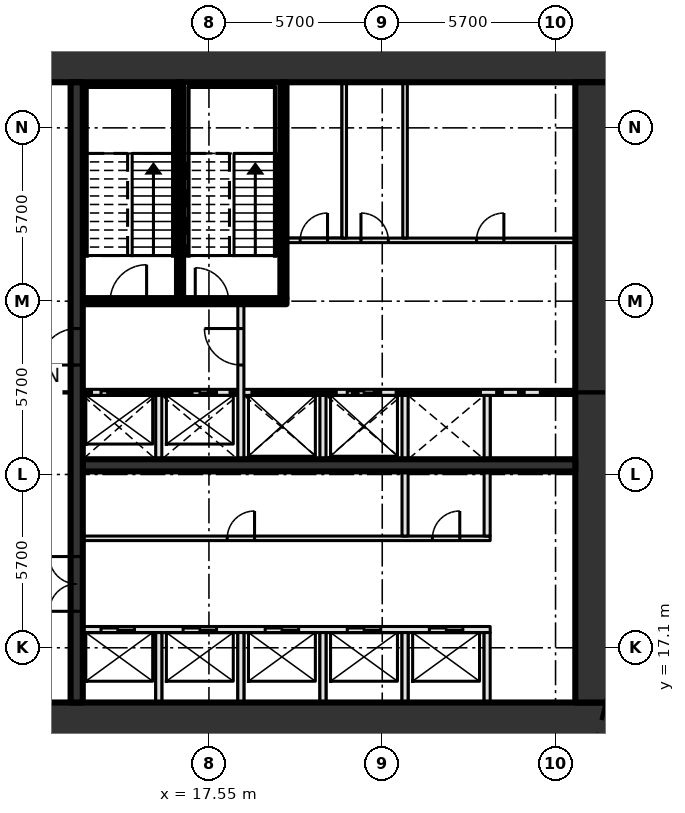
"""IFC4 building model, lengths in metres.
Left out: names, types, materials, properties, quantities, classifications, styles, units other than length and angle.
Written with IfcOpenShell. Run it as: python <this file> out.ifc"""

import sys

from ifc_helpers import new_model, si_unit, direction, frame, frame_2d, origin, place, context, subcontext, project, spatial, rectangle, extrude, element, fill, save


model = new_model("IFC4")
c1 = context("Model", 3, precision=1e-05, world=origin(), true_north=direction((0.0, 1.0)))
c2 = subcontext(c1, "Body", "Model", "MODEL_VIEW")
j1 = project(units=[si_unit("LENGTHUNIT", "METRE"), si_unit("PLANEANGLEUNIT", "RADIAN")], contexts=[c1])
p1 = place(None, origin())
s1 = spatial("IfcSite", under=j1, at=p1, CompositionType="ELEMENT")
p2 = place(p1, origin())
s2 = spatial("IfcBuilding", under=s1, at=p2, CompositionType="ELEMENT")
p3 = place(p2, frame((0.0, 0.0, 28.2)))
s3 = spatial("IfcBuildingStorey", under=s2, at=p3, CompositionType="ELEMENT", Elevation=28.2)
p4 = place(p3, frame((8.0, 14.7, -0.45), z_axis=(0.0, 0.0, 1.0), x_axis=(1.0, 0.0, 0.0)))
e1 = element("IfcWall", 1, at=p4, inside=s3, PredefinedType="SHEAR", context=c2, shape_type="SweptSolid", body=[
    extrude(rectangle(XDim=22.8, YDim=1.2, at=frame_2d((11.4, 0.0))), origin(), (0.0, 0.0, 1.0), 4.8),
])
p5 = place(p4, frame((2.3, 0.0, 0.45)))
e2 = element("IfcOpeningElement", 2, at=p5, cuts=e1, PredefinedType="OPENING", context=c2, shape_type="SweptSolid", body=[
    extrude(rectangle(XDim=1.8, YDim=2.1, at=frame_2d((0.9, 1.05))), frame((0.0, 0.61, 0.0), z_axis=(0.0, -1.0, 0.0), x_axis=(1.0, 0.0, 0.0)), (0.0, 0.0, 1.0), 1.22),
])
p6 = place(p3, frame((8.0, 36.3, -0.45), z_axis=(0.0, 0.0, 1.0), x_axis=(1.0, 0.0, 0.0)))
e3 = element("IfcWall", 3, at=p6, inside=s3, PredefinedType="SHEAR", context=c2, shape_type="SweptSolid", body=[
    extrude(rectangle(XDim=22.8, YDim=1.2, at=frame_2d((11.4, 0.0))), origin(), (0.0, 0.0, 1.0), 4.8),
])
p7 = place(p6, frame((2.3, 0.0, 0.45)))
e4 = element("IfcOpeningElement", 4, at=p7, cuts=e3, PredefinedType="OPENING", context=c2, shape_type="SweptSolid", body=[
    extrude(rectangle(XDim=1.8, YDim=2.1, at=frame_2d((0.9, 1.05))), frame((0.0, 0.61, 0.0), z_axis=(0.0, -1.0, 0.0), x_axis=(1.0, 0.0, 0.0)), (0.0, 0.0, 1.0), 1.22),
])
p8 = place(p3, frame((30.2, 15.3, -0.45), z_axis=(0.0, 0.0, 1.0), x_axis=(0.0, 1.0, 0.0)))
e5 = element("IfcWall", 5, at=p8, inside=s3, PredefinedType="SHEAR", context=c2, shape_type="SweptSolid", body=[
    extrude(rectangle(XDim=20.4, YDim=1.2, at=frame_2d((10.2, 0.0))), origin(), (0.0, 0.0, 1.0), 4.8),
])
p9 = place(p3, frame((13.4, 17.7, 0.0), z_axis=(0.0, 0.0, 1.0), x_axis=(1.0, 0.0, 0.0)))
e6 = element("IfcWall", 6, at=p9, inside=s3, PredefinedType="SOLIDWALL", context=c2, shape_type="SweptSolid", body=[
    extrude(rectangle(XDim=13.4, YDim=0.2, at=frame_2d((6.7, 0.0))), origin(), (0.0, 0.0, 1.0), 4.35),
])
p10 = place(p9, frame((0.6, 0.0, 0.0)))
e7 = element("IfcOpeningElement", 7, at=p10, cuts=e6, PredefinedType="OPENING", context=c2, shape_type="SweptSolid", body=[
    extrude(rectangle(XDim=1.1, YDim=2.1, at=frame_2d((0.55, 1.05))), frame((0.0, 0.11, 0.0), z_axis=(0.0, -1.0, 0.0), x_axis=(1.0, 0.0, 0.0)), (0.0, 0.0, 1.0), 0.22),
])
p11 = place(p9, frame((3.3, 0.0, 0.0)))
e8 = element("IfcOpeningElement", 8, at=p11, cuts=e6, PredefinedType="OPENING", context=c2, shape_type="SweptSolid", body=[
    extrude(rectangle(XDim=1.1, YDim=2.1, at=frame_2d((0.55, 1.05))), frame((0.0, 0.11, 0.0), z_axis=(0.0, -1.0, 0.0), x_axis=(1.0, 0.0, 0.0)), (0.0, 0.0, 1.0), 0.22),
])
p12 = place(p9, frame((6.0, 0.0, 0.0)))
e9 = element("IfcOpeningElement", 9, at=p12, cuts=e6, PredefinedType="OPENING", context=c2, shape_type="SweptSolid", body=[
    extrude(rectangle(XDim=1.1, YDim=2.1, at=frame_2d((0.55, 1.05))), frame((0.0, 0.11, 0.0), z_axis=(0.0, -1.0, 0.0), x_axis=(1.0, 0.0, 0.0)), (0.0, 0.0, 1.0), 0.22),
])
p13 = place(p9, frame((8.7, 0.0, 0.0)))
e10 = element("IfcOpeningElement", 10, at=p13, cuts=e6, PredefinedType="OPENING", context=c2, shape_type="SweptSolid", body=[
    extrude(rectangle(XDim=1.1, YDim=2.1, at=frame_2d((0.55, 1.05))), frame((0.0, 0.11, 0.0), z_axis=(0.0, -1.0, 0.0), x_axis=(1.0, 0.0, 0.0)), (0.0, 0.0, 1.0), 0.22),
])
p14 = place(p9, frame((11.4, 0.0, 0.0)))
e11 = element("IfcOpeningElement", 11, at=p14, cuts=e6, PredefinedType="OPENING", context=c2, shape_type="SweptSolid", body=[
    extrude(rectangle(XDim=1.1, YDim=2.1, at=frame_2d((0.55, 1.05))), frame((0.0, 0.11, 0.0), z_axis=(0.0, -1.0, 0.0), x_axis=(1.0, 0.0, 0.0)), (0.0, 0.0, 1.0), 0.22),
])
p15 = place(p3, frame((13.4, 20.7, 0.0), z_axis=(0.0, 0.0, 1.0), x_axis=(1.0, 0.0, 0.0)))
e12 = element("IfcWall", 12, at=p15, inside=s3, PredefinedType="PARTITIONING", context=c2, shape_type="SweptSolid", body=[
    extrude(rectangle(XDim=13.4, YDim=0.15, at=frame_2d((6.7, 0.0))), origin(), (0.0, 0.0, 1.0), 4.35),
])
p16 = place(p15, frame((4.75, 0.0, 0.0)))
e13 = element("IfcOpeningElement", 13, at=p16, cuts=e12, PredefinedType="OPENING", context=c2, shape_type="SweptSolid", body=[
    extrude(rectangle(XDim=0.9, YDim=2.1, at=frame_2d((0.45, 1.05))), frame((0.0, 0.085, 0.0), z_axis=(0.0, -1.0, 0.0), x_axis=(1.0, 0.0, 0.0)), (0.0, 0.0, 1.0), 0.17),
])
p17 = place(p15, frame((11.5, 0.0, 0.0)))
e14 = element("IfcOpeningElement", 14, at=p17, cuts=e12, PredefinedType="OPENING", context=c2, shape_type="SweptSolid", body=[
    extrude(rectangle(XDim=0.9, YDim=2.1, at=frame_2d((0.45, 1.05))), frame((0.0, 0.085, 0.0), z_axis=(0.0, -1.0, 0.0), x_axis=(1.0, 0.0, 0.0)), (0.0, 0.0, 1.0), 0.17),
])
p18 = place(p3, frame((13.4, 23.1, 0.0), z_axis=(0.0, 0.0, 1.0), x_axis=(1.0, 0.0, 0.0)))
e15 = element("IfcWall", 15, at=p18, inside=s3, PredefinedType="SHEAR", context=c2, shape_type="SweptSolid", body=[
    extrude(rectangle(XDim=16.2, YDim=0.4, at=frame_2d((8.1, 0.0))), origin(), (0.0, 0.0, 1.0), 4.35),
])
p19 = place(p3, frame((13.4, 25.5, 0.0), z_axis=(0.0, 0.0, 1.0), x_axis=(1.0, 0.0, 0.0)))
e16 = element("IfcWall", 16, at=p19, inside=s3, PredefinedType="SOLIDWALL", context=c2, shape_type="SweptSolid", body=[
    extrude(rectangle(XDim=16.2, YDim=0.2, at=frame_2d((8.1, 0.0))), origin(), (0.0, 0.0, 1.0), 4.35),
])
p20 = place(p19, frame((0.6, 0.0, 0.0)))
e17 = element("IfcOpeningElement", 17, at=p20, cuts=e16, PredefinedType="OPENING", context=c2, shape_type="SweptSolid", body=[
    extrude(rectangle(XDim=1.1, YDim=2.1, at=frame_2d((0.55, 1.05))), frame((0.0, 0.11, 0.0), z_axis=(0.0, -1.0, 0.0), x_axis=(1.0, 0.0, 0.0)), (0.0, 0.0, 1.0), 0.22),
])
p21 = place(p19, frame((3.3, 0.0, 0.0)))
e18 = element("IfcOpeningElement", 18, at=p21, cuts=e16, PredefinedType="OPENING", context=c2, shape_type="SweptSolid", body=[
    extrude(rectangle(XDim=1.1, YDim=2.1, at=frame_2d((0.55, 1.05))), frame((0.0, 0.11, 0.0), z_axis=(0.0, -1.0, 0.0), x_axis=(1.0, 0.0, 0.0)), (0.0, 0.0, 1.0), 0.22),
])
p22 = place(p19, frame((6.0, 0.0, 0.0)))
e19 = element("IfcOpeningElement", 19, at=p22, cuts=e16, PredefinedType="OPENING", context=c2, shape_type="SweptSolid", body=[
    extrude(rectangle(XDim=1.1, YDim=2.1, at=frame_2d((0.55, 1.05))), frame((0.0, 0.11, 0.0), z_axis=(0.0, -1.0, 0.0), x_axis=(1.0, 0.0, 0.0)), (0.0, 0.0, 1.0), 0.22),
])
p23 = place(p19, frame((8.7, 0.0, 0.0)))
e20 = element("IfcOpeningElement", 20, at=p23, cuts=e16, PredefinedType="OPENING", context=c2, shape_type="SweptSolid", body=[
    extrude(rectangle(XDim=1.1, YDim=2.1, at=frame_2d((0.55, 1.05))), frame((0.0, 0.11, 0.0), z_axis=(0.0, -1.0, 0.0), x_axis=(1.0, 0.0, 0.0)), (0.0, 0.0, 1.0), 0.22),
])
p24 = place(p3, frame((13.4, 28.5, 0.0), z_axis=(0.0, 0.0, 1.0), x_axis=(1.0, 0.0, 0.0)))
e21 = element("IfcWall", 21, at=p24, inside=s3, PredefinedType="SOLIDWALL", context=c2, shape_type="SweptSolid", body=[
    extrude(rectangle(XDim=6.7, YDim=0.2, at=frame_2d((3.35, 0.0))), origin(), (0.0, 0.0, 1.0), 4.35),
])
p25 = place(p24, frame((0.9, 0.0, 0.0)))
e22 = element("IfcOpeningElement", 22, at=p25, cuts=e21, PredefinedType="OPENING", context=c2, shape_type="SweptSolid", body=[
    extrude(rectangle(XDim=1.2, YDim=2.1, at=frame_2d((0.6, 1.05))), frame((0.0, 0.11, 0.0), z_axis=(0.0, -1.0, 0.0), x_axis=(1.0, 0.0, 0.0)), (0.0, 0.0, 1.0), 0.22),
])
p26 = place(p24, frame((3.7, 0.0, 0.0)))
e23 = element("IfcOpeningElement", 23, at=p26, cuts=e21, PredefinedType="OPENING", context=c2, shape_type="SweptSolid", body=[
    extrude(rectangle(XDim=1.1, YDim=2.1, at=frame_2d((0.55, 1.05))), frame((0.0, 0.11, 0.0), z_axis=(0.0, -1.0, 0.0), x_axis=(1.0, 0.0, 0.0)), (0.0, 0.0, 1.0), 0.22),
])
p27 = place(p3, frame((20.1, 30.5, 0.0), z_axis=(0.0, 0.0, 1.0), x_axis=(1.0, 0.0, 0.0)))
e24 = element("IfcWall", 24, at=p27, inside=s3, PredefinedType="PARTITIONING", context=c2, shape_type="SweptSolid", body=[
    extrude(rectangle(XDim=9.5, YDim=0.15, at=frame_2d((4.75, 0.0))), origin(), (0.0, 0.0, 1.0), 4.35),
])
p28 = place(p27, frame((0.45, 0.0, 0.0)))
e25 = element("IfcOpeningElement", 25, at=p28, cuts=e24, PredefinedType="OPENING", context=c2, shape_type="SweptSolid", body=[
    extrude(rectangle(XDim=0.9, YDim=2.1, at=frame_2d((0.45, 1.05))), frame((0.0, 0.085, 0.0), z_axis=(0.0, -1.0, 0.0), x_axis=(1.0, 0.0, 0.0)), (0.0, 0.0, 1.0), 0.17),
])
p29 = place(p27, frame((2.45, 0.0, 0.0)))
e26 = element("IfcOpeningElement", 26, at=p29, cuts=e24, PredefinedType="OPENING", context=c2, shape_type="SweptSolid", body=[
    extrude(rectangle(XDim=0.9, YDim=2.1, at=frame_2d((0.45, 1.05))), frame((0.0, 0.085, 0.0), z_axis=(0.0, -1.0, 0.0), x_axis=(1.0, 0.0, 0.0)), (0.0, 0.0, 1.0), 0.17),
])
p30 = place(p27, frame((6.25, 0.0, 0.0)))
e27 = element("IfcOpeningElement", 27, at=p30, cuts=e24, PredefinedType="OPENING", context=c2, shape_type="SweptSolid", body=[
    extrude(rectangle(XDim=0.9, YDim=2.1, at=frame_2d((0.45, 1.05))), frame((0.0, 0.085, 0.0), z_axis=(0.0, -1.0, 0.0), x_axis=(1.0, 0.0, 0.0)), (0.0, 0.0, 1.0), 0.17),
])
p31 = place(p3, frame((13.2, 15.3, 0.0), z_axis=(0.0, 0.0, 1.0), x_axis=(0.0, 1.0, 0.0)))
e28 = element("IfcWall", 28, at=p31, inside=s3, PredefinedType="SHEAR", context=c2, shape_type="SweptSolid", body=[
    extrude(rectangle(XDim=20.4, YDim=0.4, at=frame_2d((10.2, 0.0))), origin(), (0.0, 0.0, 1.0), 4.35),
])
p32 = place(p31, frame((3.0, 0.0, 0.0)))
e29 = element("IfcOpeningElement", 29, at=p32, cuts=e28, PredefinedType="OPENING", context=c2, shape_type="SweptSolid", body=[
    extrude(rectangle(XDim=1.8, YDim=2.1, at=frame_2d((0.9, 1.05))), frame((0.0, 0.21, 0.0), z_axis=(0.0, -1.0, 0.0), x_axis=(1.0, 0.0, 0.0)), (0.0, 0.0, 1.0), 0.42),
])
p33 = place(p31, frame((11.1, 0.0, 0.0)))
e30 = element("IfcOpeningElement", 30, at=p33, cuts=e28, PredefinedType="OPENING", context=c2, shape_type="SweptSolid", body=[
    extrude(rectangle(XDim=1.2, YDim=2.1, at=frame_2d((0.6, 1.05))), frame((0.0, 0.21, 0.0), z_axis=(0.0, -1.0, 0.0), x_axis=(1.0, 0.0, 0.0)), (0.0, 0.0, 1.0), 0.42),
])
p34 = place(p3, frame((15.9, 15.3, 0.0), z_axis=(0.0, 0.0, 1.0), x_axis=(0.0, 1.0, 0.0)))
e31 = element("IfcWall", 31, at=p34, inside=s3, PredefinedType="SOLIDWALL", context=c2, shape_type="SweptSolid", body=[
    extrude(rectangle(XDim=2.3, YDim=0.2, at=frame_2d((1.15, 0.0))), origin(), (0.0, 0.0, 1.0), 4.35),
])
p35 = place(p3, frame((15.9, 23.3, 0.0), z_axis=(0.0, 0.0, 1.0), x_axis=(0.0, 1.0, 0.0)))
e32 = element("IfcWall", 32, at=p35, inside=s3, PredefinedType="SOLIDWALL", context=c2, shape_type="SweptSolid", body=[
    extrude(rectangle(XDim=2.1, YDim=0.2, at=frame_2d((1.05, 0.0))), origin(), (0.0, 0.0, 1.0), 4.35),
])
p36 = place(p3, frame((16.6, 28.6, 0.0), z_axis=(0.0, 0.0, 1.0), x_axis=(0.0, 1.0, 0.0)))
e33 = element("IfcWall", 33, at=p36, inside=s3, PredefinedType="SOLIDWALL", context=c2, shape_type="SweptSolid", body=[
    extrude(rectangle(XDim=7.1, YDim=0.2, at=frame_2d((3.55, 0.0))), origin(), (0.0, 0.0, 1.0), 4.35),
])
p37 = place(p3, frame((18.6, 15.3, 0.0), z_axis=(0.0, 0.0, 1.0), x_axis=(0.0, 1.0, 0.0)))
e34 = element("IfcWall", 34, at=p37, inside=s3, PredefinedType="SOLIDWALL", context=c2, shape_type="SweptSolid", body=[
    extrude(rectangle(XDim=2.3, YDim=0.2, at=frame_2d((1.15, 0.0))), origin(), (0.0, 0.0, 1.0), 4.35),
])
p38 = place(p3, frame((18.6, 23.3, 0.0), z_axis=(0.0, 0.0, 1.0), x_axis=(0.0, 1.0, 0.0)))
e35 = element("IfcWall", 35, at=p38, inside=s3, PredefinedType="SOLIDWALL", context=c2, shape_type="SweptSolid", body=[
    extrude(rectangle(XDim=5.1, YDim=0.2, at=frame_2d((2.55, 0.0))), origin(), (0.0, 0.0, 1.0), 4.35),
])
p39 = place(p38, frame((3.1, 0.0, 0.0)))
e36 = element("IfcOpeningElement", 36, at=p39, cuts=e35, PredefinedType="OPENING", context=c2, shape_type="SweptSolid", body=[
    extrude(rectangle(XDim=1.2, YDim=2.1, at=frame_2d((0.6, 1.05))), frame((0.0, 0.11, 0.0), z_axis=(0.0, -1.0, 0.0), x_axis=(1.0, 0.0, 0.0)), (0.0, 0.0, 1.0), 0.22),
])
p40 = place(p3, frame((20.0, 28.6, 0.0), z_axis=(0.0, 0.0, 1.0), x_axis=(0.0, 1.0, 0.0)))
e37 = element("IfcWall", 37, at=p40, inside=s3, PredefinedType="SOLIDWALL", context=c2, shape_type="SweptSolid", body=[
    extrude(rectangle(XDim=7.1, YDim=0.2, at=frame_2d((3.55, 0.0))), origin(), (0.0, 0.0, 1.0), 4.35),
])
p41 = place(p3, frame((21.3, 15.3, 0.0), z_axis=(0.0, 0.0, 1.0), x_axis=(0.0, 1.0, 0.0)))
e38 = element("IfcWall", 38, at=p41, inside=s3, PredefinedType="SOLIDWALL", context=c2, shape_type="SweptSolid", body=[
    extrude(rectangle(XDim=2.3, YDim=0.2, at=frame_2d((1.15, 0.0))), origin(), (0.0, 0.0, 1.0), 4.35),
])
p42 = place(p3, frame((21.3, 23.3, 0.0), z_axis=(0.0, 0.0, 1.0), x_axis=(0.0, 1.0, 0.0)))
e39 = element("IfcWall", 39, at=p42, inside=s3, PredefinedType="SOLIDWALL", context=c2, shape_type="SweptSolid", body=[
    extrude(rectangle(XDim=2.1, YDim=0.2, at=frame_2d((1.05, 0.0))), origin(), (0.0, 0.0, 1.0), 4.35),
])
p43 = place(p3, frame((22.0, 30.575, 0.0), z_axis=(0.0, 0.0, 1.0), x_axis=(0.0, 1.0, 0.0)))
e40 = element("IfcWall", 40, at=p43, inside=s3, PredefinedType="PARTITIONING", context=c2, shape_type="SweptSolid", body=[
    extrude(rectangle(XDim=5.125, YDim=0.15, at=frame_2d((2.562, 0.0))), origin(), (0.0, 0.0, 1.0), 4.35),
])
p44 = place(p3, frame((24.0, 15.3, 0.0), z_axis=(0.0, 0.0, 1.0), x_axis=(0.0, 1.0, 0.0)))
e41 = element("IfcWall", 41, at=p44, inside=s3, PredefinedType="SOLIDWALL", context=c2, shape_type="SweptSolid", body=[
    extrude(rectangle(XDim=2.3, YDim=0.2, at=frame_2d((1.15, 0.0))), origin(), (0.0, 0.0, 1.0), 4.35),
])
p45 = place(p3, frame((24.0, 20.775, 0.0), z_axis=(0.0, 0.0, 1.0), x_axis=(0.0, 1.0, 0.0)))
e42 = element("IfcWall", 42, at=p45, inside=s3, PredefinedType="SOLIDWALL", context=c2, shape_type="SweptSolid", body=[
    extrude(rectangle(XDim=4.625, YDim=0.2, at=frame_2d((2.312, 0.0))), origin(), (0.0, 0.0, 1.0), 4.35),
])
p46 = place(p3, frame((24.0, 30.575, 0.0), z_axis=(0.0, 0.0, 1.0), x_axis=(0.0, 1.0, 0.0)))
e43 = element("IfcWall", 43, at=p46, inside=s3, PredefinedType="PARTITIONING", context=c2, shape_type="SweptSolid", body=[
    extrude(rectangle(XDim=5.125, YDim=0.15, at=frame_2d((2.562, 0.0))), origin(), (0.0, 0.0, 1.0), 4.35),
])
p47 = place(p3, frame((26.7, 15.3, 0.0), z_axis=(0.0, 0.0, 1.0), x_axis=(0.0, 1.0, 0.0)))
e44 = element("IfcWall", 44, at=p47, inside=s3, PredefinedType="SOLIDWALL", context=c2, shape_type="SweptSolid", body=[
    extrude(rectangle(XDim=2.3, YDim=0.2, at=frame_2d((1.15, 0.0))), origin(), (0.0, 0.0, 1.0), 4.35),
])
p48 = place(p3, frame((26.7, 20.775, 0.0), z_axis=(0.0, 0.0, 1.0), x_axis=(0.0, 1.0, 0.0)))
e45 = element("IfcWall", 45, at=p48, inside=s3, PredefinedType="SOLIDWALL", context=c2, shape_type="SweptSolid", body=[
    extrude(rectangle(XDim=4.625, YDim=0.2, at=frame_2d((2.312, 0.0))), origin(), (0.0, 0.0, 1.0), 4.35),
])
p49 = place(p10, origin())
e46 = element("IfcDoor", 46, at=p49, inside=s3, OperationType="SLIDING_TO_LEFT", PredefinedType="DOOR", context=c2, shape_type="SweptSolid", body=[
    extrude(rectangle(XDim=1.1, YDim=2.1, at=frame_2d((0.55, 1.05))), frame((0.0, 0.025, 0.0), z_axis=(0.0, -1.0, 0.0), x_axis=(1.0, 0.0, 0.0)), (0.0, 0.0, 1.0), 0.05),
])
fill(e7, e46)
p50 = place(p11, origin())
e47 = element("IfcDoor", 47, at=p50, inside=s3, OperationType="SLIDING_TO_LEFT", PredefinedType="DOOR", context=c2, shape_type="SweptSolid", body=[
    extrude(rectangle(XDim=1.1, YDim=2.1, at=frame_2d((0.55, 1.05))), frame((0.0, 0.025, 0.0), z_axis=(0.0, -1.0, 0.0), x_axis=(1.0, 0.0, 0.0)), (0.0, 0.0, 1.0), 0.05),
])
fill(e8, e47)
p51 = place(p12, origin())
e48 = element("IfcDoor", 48, at=p51, inside=s3, OperationType="SLIDING_TO_LEFT", PredefinedType="DOOR", context=c2, shape_type="SweptSolid", body=[
    extrude(rectangle(XDim=1.1, YDim=2.1, at=frame_2d((0.55, 1.05))), frame((0.0, 0.025, 0.0), z_axis=(0.0, -1.0, 0.0), x_axis=(1.0, 0.0, 0.0)), (0.0, 0.0, 1.0), 0.05),
])
fill(e9, e48)
p52 = place(p13, origin())
e49 = element("IfcDoor", 49, at=p52, inside=s3, OperationType="SLIDING_TO_LEFT", PredefinedType="DOOR", context=c2, shape_type="SweptSolid", body=[
    extrude(rectangle(XDim=1.1, YDim=2.1, at=frame_2d((0.55, 1.05))), frame((0.0, 0.025, 0.0), z_axis=(0.0, -1.0, 0.0), x_axis=(1.0, 0.0, 0.0)), (0.0, 0.0, 1.0), 0.05),
])
fill(e10, e49)
p53 = place(p14, origin())
e50 = element("IfcDoor", 50, at=p53, inside=s3, OperationType="SLIDING_TO_LEFT", PredefinedType="DOOR", context=c2, shape_type="SweptSolid", body=[
    extrude(rectangle(XDim=1.1, YDim=2.1, at=frame_2d((0.55, 1.05))), frame((0.0, 0.025, 0.0), z_axis=(0.0, -1.0, 0.0), x_axis=(1.0, 0.0, 0.0)), (0.0, 0.0, 1.0), 0.05),
])
fill(e11, e50)
p54 = place(p20, origin())
e51 = element("IfcDoor", 51, at=p54, inside=s3, OperationType="SLIDING_TO_LEFT", PredefinedType="DOOR", context=c2, shape_type="SweptSolid", body=[
    extrude(rectangle(XDim=1.1, YDim=2.1, at=frame_2d((0.55, 1.05))), frame((0.0, 0.025, 0.0), z_axis=(0.0, -1.0, 0.0), x_axis=(1.0, 0.0, 0.0)), (0.0, 0.0, 1.0), 0.05),
])
fill(e17, e51)
p55 = place(p21, origin())
e52 = element("IfcDoor", 52, at=p55, inside=s3, OperationType="SLIDING_TO_LEFT", PredefinedType="DOOR", context=c2, shape_type="SweptSolid", body=[
    extrude(rectangle(XDim=1.1, YDim=2.1, at=frame_2d((0.55, 1.05))), frame((0.0, 0.025, 0.0), z_axis=(0.0, -1.0, 0.0), x_axis=(1.0, 0.0, 0.0)), (0.0, 0.0, 1.0), 0.05),
])
fill(e18, e52)
p56 = place(p22, origin())
e53 = element("IfcDoor", 53, at=p56, inside=s3, OperationType="SLIDING_TO_LEFT", PredefinedType="DOOR", context=c2, shape_type="SweptSolid", body=[
    extrude(rectangle(XDim=1.1, YDim=2.1, at=frame_2d((0.55, 1.05))), frame((0.0, 0.025, 0.0), z_axis=(0.0, -1.0, 0.0), x_axis=(1.0, 0.0, 0.0)), (0.0, 0.0, 1.0), 0.05),
])
fill(e19, e53)
p57 = place(p23, origin())
e54 = element("IfcDoor", 54, at=p57, inside=s3, OperationType="SLIDING_TO_LEFT", PredefinedType="DOOR", context=c2, shape_type="SweptSolid", body=[
    extrude(rectangle(XDim=1.1, YDim=2.1, at=frame_2d((0.55, 1.05))), frame((0.0, 0.025, 0.0), z_axis=(0.0, -1.0, 0.0), x_axis=(1.0, 0.0, 0.0)), (0.0, 0.0, 1.0), 0.05),
])
fill(e20, e54)
p58 = place(p16, origin())
e55 = element("IfcDoor", 55, at=p58, inside=s3, OperationType="SINGLE_SWING_RIGHT", PredefinedType="DOOR", context=c2, shape_type="SweptSolid", body=[
    extrude(rectangle(XDim=0.9, YDim=2.1, at=frame_2d((0.45, 1.05))), frame((0.0, 0.025, 0.0), z_axis=(0.0, -1.0, 0.0), x_axis=(1.0, 0.0, 0.0)), (0.0, 0.0, 1.0), 0.05),
])
fill(e13, e55)
p59 = place(p17, origin())
e56 = element("IfcDoor", 56, at=p59, inside=s3, OperationType="SINGLE_SWING_RIGHT", PredefinedType="DOOR", context=c2, shape_type="SweptSolid", body=[
    extrude(rectangle(XDim=0.9, YDim=2.1, at=frame_2d((0.45, 1.05))), frame((0.0, 0.025, 0.0), z_axis=(0.0, -1.0, 0.0), x_axis=(1.0, 0.0, 0.0)), (0.0, 0.0, 1.0), 0.05),
])
fill(e14, e56)
p60 = place(p28, origin())
e57 = element("IfcDoor", 57, at=p60, inside=s3, OperationType="SINGLE_SWING_RIGHT", PredefinedType="DOOR", context=c2, shape_type="SweptSolid", body=[
    extrude(rectangle(XDim=0.9, YDim=2.1, at=frame_2d((0.45, 1.05))), frame((0.0, 0.025, 0.0), z_axis=(0.0, -1.0, 0.0), x_axis=(1.0, 0.0, 0.0)), (0.0, 0.0, 1.0), 0.05),
])
fill(e25, e57)
p61 = place(p29, origin())
e58 = element("IfcDoor", 58, at=p61, inside=s3, OperationType="SINGLE_SWING_LEFT", PredefinedType="DOOR", context=c2, shape_type="SweptSolid", body=[
    extrude(rectangle(XDim=0.9, YDim=2.1, at=frame_2d((0.45, 1.05))), frame((0.0, 0.025, 0.0), z_axis=(0.0, -1.0, 0.0), x_axis=(1.0, 0.0, 0.0)), (0.0, 0.0, 1.0), 0.05),
])
fill(e26, e58)
p62 = place(p30, origin())
e59 = element("IfcDoor", 59, at=p62, inside=s3, OperationType="SINGLE_SWING_RIGHT", PredefinedType="DOOR", context=c2, shape_type="SweptSolid", body=[
    extrude(rectangle(XDim=0.9, YDim=2.1, at=frame_2d((0.45, 1.05))), frame((0.0, 0.025, 0.0), z_axis=(0.0, -1.0, 0.0), x_axis=(1.0, 0.0, 0.0)), (0.0, 0.0, 1.0), 0.05),
])
fill(e27, e59)
p63 = place(p25, origin())
e60 = element("IfcDoor", 60, at=p63, inside=s3, OperationType="SINGLE_SWING_RIGHT", PredefinedType="DOOR", context=c2, shape_type="SweptSolid", body=[
    extrude(rectangle(XDim=1.2, YDim=2.1, at=frame_2d((0.6, 1.05))), frame((0.0, 0.025, 0.0), z_axis=(0.0, -1.0, 0.0), x_axis=(1.0, 0.0, 0.0)), (0.0, 0.0, 1.0), 0.05),
])
fill(e22, e60)
p64 = place(p26, origin())
e61 = element("IfcDoor", 61, at=p64, inside=s3, OperationType="SINGLE_SWING_LEFT", PredefinedType="DOOR", context=c2, shape_type="SweptSolid", body=[
    extrude(rectangle(XDim=1.1, YDim=2.1, at=frame_2d((0.55, 1.05))), frame((0.0, 0.025, 0.0), z_axis=(0.0, -1.0, 0.0), x_axis=(1.0, 0.0, 0.0)), (0.0, 0.0, 1.0), 0.05),
])
fill(e23, e61)
p65 = place(p32, origin())
e62 = element("IfcDoor", 62, at=p65, inside=s3, OperationType="DOUBLE_DOOR_SINGLE_SWING", PredefinedType="DOOR", context=c2, shape_type="SweptSolid", body=[
    extrude(rectangle(XDim=1.8, YDim=2.1, at=frame_2d((0.9, 1.05))), frame((0.0, 0.025, 0.0), z_axis=(0.0, -1.0, 0.0), x_axis=(1.0, 0.0, 0.0)), (0.0, 0.0, 1.0), 0.05),
])
fill(e29, e62)
p66 = place(p33, origin())
e63 = element("IfcDoor", 63, at=p66, inside=s3, OperationType="SINGLE_SWING_LEFT", PredefinedType="DOOR", context=c2, shape_type="SweptSolid", body=[
    extrude(rectangle(XDim=1.2, YDim=2.1, at=frame_2d((0.6, 1.05))), frame((0.0, 0.025, 0.0), z_axis=(0.0, -1.0, 0.0), x_axis=(1.0, 0.0, 0.0)), (0.0, 0.0, 1.0), 0.05),
])
fill(e30, e63)
p67 = place(p39, origin())
e64 = element("IfcDoor", 64, at=p67, inside=s3, OperationType="SINGLE_SWING_RIGHT", PredefinedType="DOOR", context=c2, shape_type="SweptSolid", body=[
    extrude(rectangle(XDim=1.2, YDim=2.1, at=frame_2d((0.6, 1.05))), frame((0.0, 0.025, 0.0), z_axis=(0.0, -1.0, 0.0), x_axis=(1.0, 0.0, 0.0)), (0.0, 0.0, 1.0), 0.05),
])
fill(e36, e64)
save(model, sys.argv[1])
